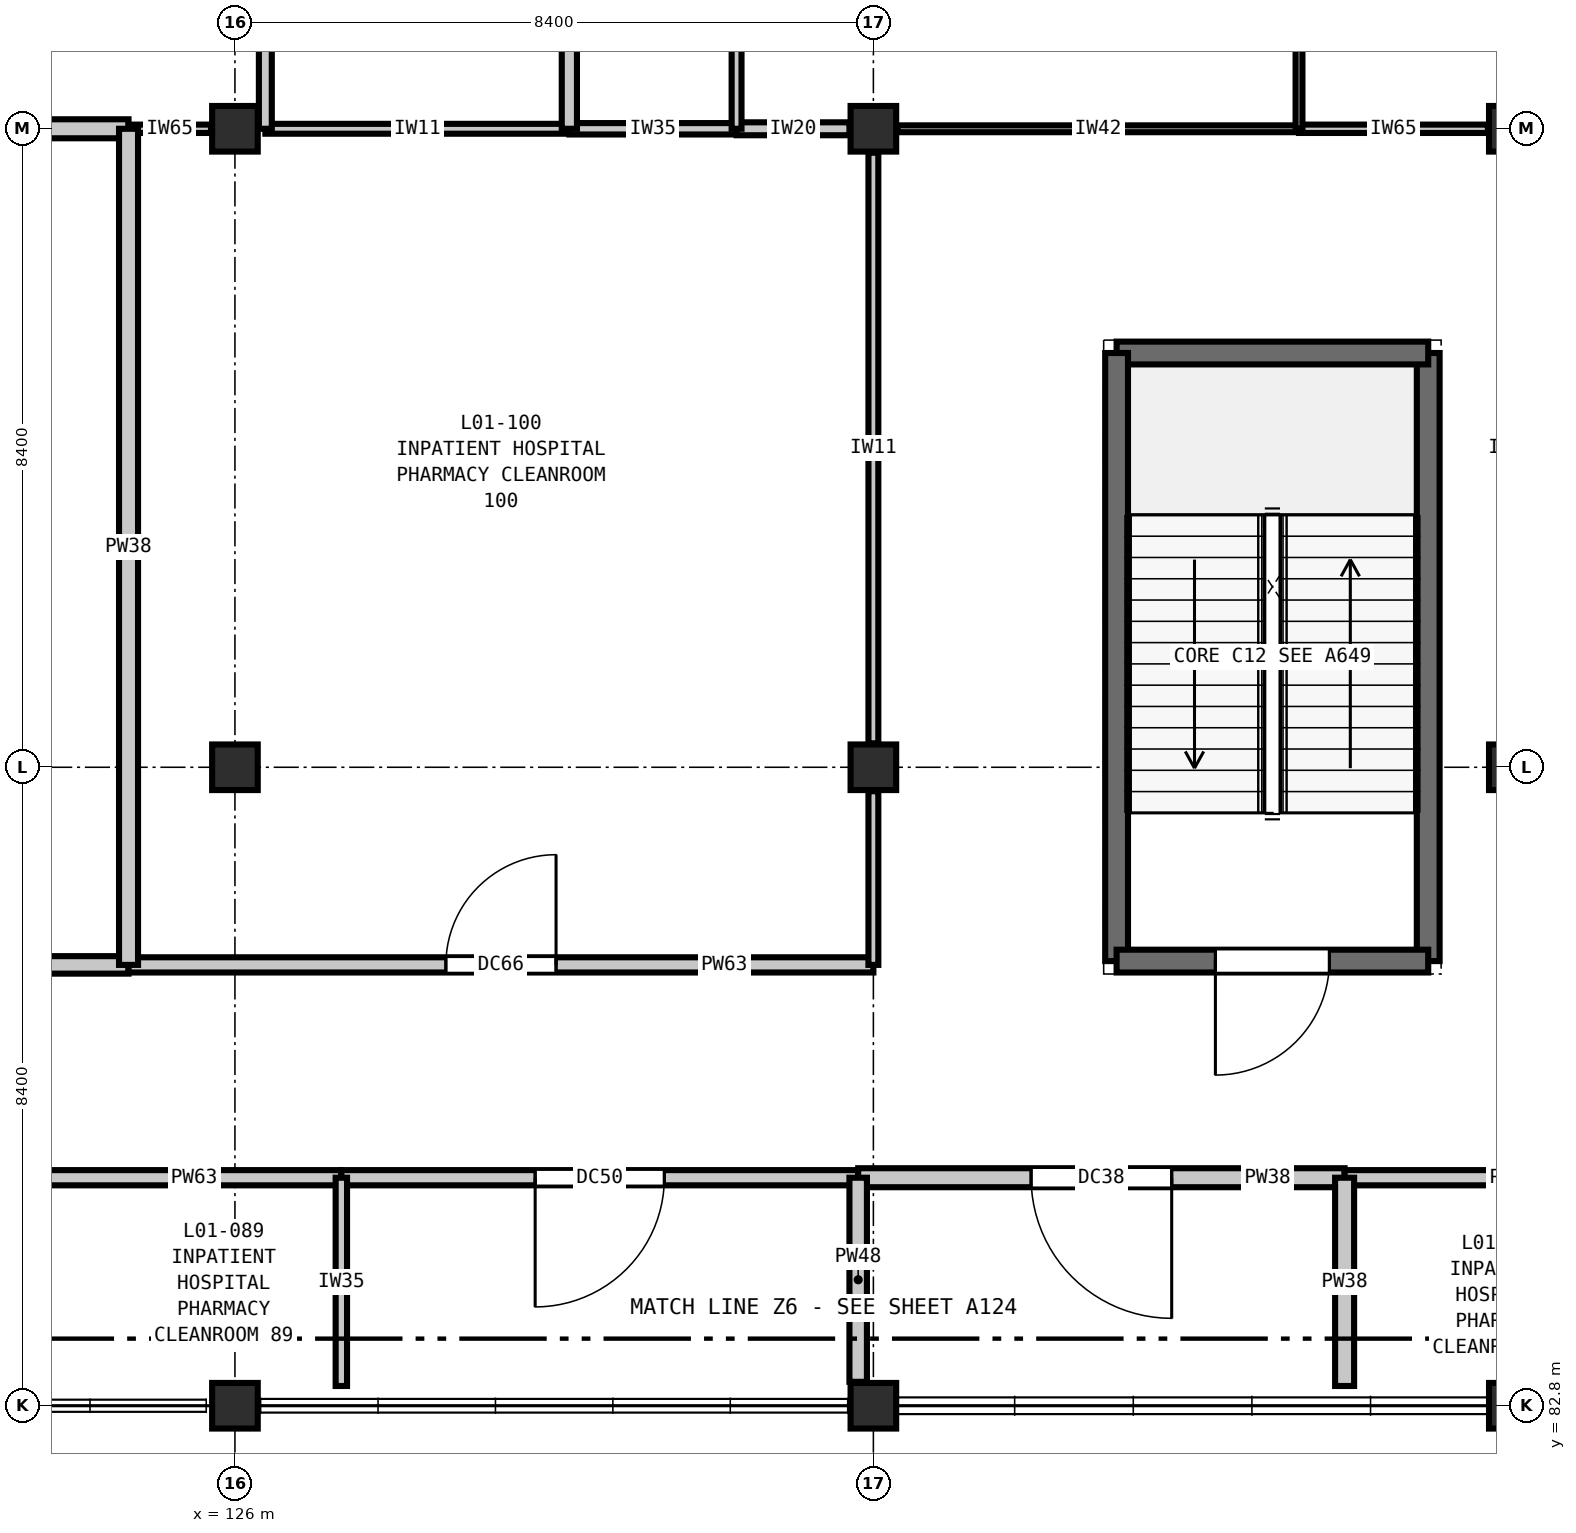
"""IFC4 building model, lengths in metres.
Left out: names, types, materials, properties, quantities, classifications, styles, units other than length and angle.
Written with IfcOpenShell. Run it as: python <this file> out.ifc"""

import sys

from ifc_helpers import new_model, si_unit, direction, frame, frame_2d, origin, origin_2d, place, context, subcontext, project, spatial, rectangle, extrude, element, fill, save


model = new_model("IFC4")
c1 = context("Model", 3, precision=1e-05, world=origin(), true_north=direction((0.0, 1.0)))
c2 = subcontext(c1, "Body", "Model", "MODEL_VIEW")
j1 = project(units=[si_unit("LENGTHUNIT", "METRE"), si_unit("PLANEANGLEUNIT", "RADIAN")], contexts=[c1])
p1 = place(None, origin())
s1 = spatial("IfcSite", under=j1, at=p1, CompositionType="ELEMENT")
p2 = place(p1, origin())
s2 = spatial("IfcBuilding", under=s1, at=p2, CompositionType="ELEMENT")
p3 = place(p2, frame((0.0, 0.0, 5.4)))
s3 = spatial("IfcBuildingStorey", under=s2, at=p3, CompositionType="ELEMENT", Elevation=5.4)
for number, where, z_axis, x_axis in (
    (1, (126.0, 82.8, 0.0), (0.0, 0.0, 1.0), (1.0, 0.0, 0.0)),
    (2, (126.0, 91.2, 0.0), (0.0, 0.0, 1.0), (1.0, 0.0, 0.0)),
    (3, (126.0, 99.6, 0.0), (0.0, 0.0, 1.0), (1.0, 0.0, 0.0)),
    (4, (134.4, 82.8, 0.0), (0.0, 0.0, 1.0), (1.0, 0.0, 0.0)),
    (5, (134.4, 91.2, 0.0), (0.0, 0.0, 1.0), (1.0, 0.0, 0.0)),
    (6, (134.4, 99.6, 0.0), (0.0, 0.0, 1.0), (1.0, 0.0, 0.0)),
    (7, (142.8, 82.8, 0.0), (0.0, 0.0, 1.0), (1.0, 0.0, 0.0)),
    (8, (142.8, 91.2, 0.0), (0.0, 0.0, 1.0), (1.0, 0.0, 0.0)),
    (9, (142.8, 99.6, 0.0), (0.0, 0.0, 1.0), (1.0, 0.0, 0.0)),
):
    element("IfcColumn", number, at=place(p3, frame(where, z_axis=z_axis, x_axis=x_axis)), inside=s3, PredefinedType="COLUMN", context=c2, shape_type="SweptSolid", body=[
        extrude(rectangle(XDim=0.6, YDim=0.6, at=origin_2d()), origin(), (0.0, 0.0, 1.0), 5.4),
    ])
p4 = place(p3, frame((141.7, 88.65, 0.0), z_axis=(0.0, 0.0, 1.0), x_axis=(0.0, 1.0, 0.0)))
e10 = element("IfcWall", 10, at=p4, inside=s3, PredefinedType="SHEAR", context=c2, shape_type="SweptSolid", body=[
    extrude(rectangle(XDim=8.0, YDim=0.3, at=frame_2d((4.0, 0.0))), origin(), (0.0, 0.0, 1.0), 5.4),
])
p5 = place(p3, frame((141.7, 96.65, 0.0), z_axis=(0.0, 0.0, 1.0), x_axis=(-1.0, 0.0, 0.0)))
e11 = element("IfcWall", 11, at=p5, inside=s3, PredefinedType="SHEAR", context=c2, shape_type="SweptSolid", body=[
    extrude(rectangle(XDim=4.1, YDim=0.3, at=frame_2d((2.05, 0.0))), origin(), (0.0, 0.0, 1.0), 5.4),
])
p6 = place(p3, frame((137.6, 96.65, 0.0), z_axis=(0.0, 0.0, 1.0), x_axis=(0.0, -1.0, 0.0)))
e12 = element("IfcWall", 12, at=p6, inside=s3, PredefinedType="SHEAR", context=c2, shape_type="SweptSolid", body=[
    extrude(rectangle(XDim=8.0, YDim=0.3, at=frame_2d((4.0, 0.0))), origin(), (0.0, 0.0, 1.0), 5.4),
])
p7 = place(p3, frame((137.6, 88.65, 0.0), z_axis=(0.0, 0.0, 1.0), x_axis=(1.0, 0.0, 0.0)))
e13 = element("IfcWall", 13, at=p7, inside=s3, PredefinedType="SHEAR", context=c2, shape_type="SweptSolid", body=[
    extrude(rectangle(XDim=4.1, YDim=0.3, at=frame_2d((2.05, 0.0))), origin(), (0.0, 0.0, 1.0), 5.4),
])
p8 = place(p7, frame((1.3, 0.0, 0.0)))
e14 = element("IfcOpeningElement", 14, at=p8, cuts=e13, PredefinedType="OPENING", context=c2, shape_type="SweptSolid", body=[
    extrude(rectangle(XDim=1.5, YDim=2.2, at=frame_2d((0.75, 1.1))), frame((0.0, 0.16, 0.0), z_axis=(0.0, -1.0, 0.0), x_axis=(1.0, 0.0, 0.0)), (0.0, 0.0, 1.0), 0.32),
])
p9 = place(p3, frame((117.6, 85.8, 0.0), z_axis=(0.0, 0.0, 1.0), x_axis=(1.0, 0.0, 0.0)))
e15 = element("IfcWall", 15, at=p9, inside=s3, PredefinedType="PARTITIONING", context=c2, shape_type="SweptSolid", body=[
    extrude(rectangle(XDim=9.8, YDim=0.2, at=frame_2d((4.9, 0.0))), origin(), (0.0, 0.0, 1.0), 5.05),
])
p10 = place(p9, frame((4.125, 0.0, 0.0)))
e16 = element("IfcOpeningElement", 16, at=p10, cuts=e15, PredefinedType="OPENING", context=c2, shape_type="SweptSolid", body=[
    extrude(rectangle(XDim=1.55, YDim=2.25, at=frame_2d((0.775, 1.125))), frame((0.0, 0.11, 0.0), z_axis=(0.0, -1.0, 0.0), x_axis=(1.0, 0.0, 0.0)), (0.0, 0.0, 1.0), 0.22),
])
p11 = place(p3, frame((127.4, 85.8, 0.0), z_axis=(0.0, 0.0, 1.0), x_axis=(1.0, 0.0, 0.0)))
e17 = element("IfcWall", 17, at=p11, inside=s3, PredefinedType="PARTITIONING", context=c2, shape_type="SweptSolid", body=[
    extrude(rectangle(XDim=6.8, YDim=0.2, at=frame_2d((3.4, 0.0))), origin(), (0.0, 0.0, 1.0), 5.05),
])
p12 = place(p11, frame((2.55, 0.0, 0.0)))
e18 = element("IfcOpeningElement", 18, at=p12, cuts=e17, PredefinedType="OPENING", context=c2, shape_type="SweptSolid", body=[
    extrude(rectangle(XDim=1.7, YDim=2.3, at=frame_2d((0.85, 1.15))), frame((0.0, 0.11, 0.0), z_axis=(0.0, -1.0, 0.0), x_axis=(1.0, 0.0, 0.0)), (0.0, 0.0, 1.0), 0.22),
])
p13 = place(p3, frame((134.2, 85.8, 0.0), z_axis=(0.0, 0.0, 1.0), x_axis=(1.0, 0.0, 0.0)))
e19 = element("IfcWall", 19, at=p13, inside=s3, PredefinedType="PARTITIONING", context=c2, shape_type="SweptSolid", body=[
    extrude(rectangle(XDim=6.4, YDim=0.25, at=frame_2d((3.2, 0.0))), origin(), (0.0, 0.0, 1.0), 5.05),
])
p14 = place(p13, frame((2.275, 0.0, 0.0)))
e20 = element("IfcOpeningElement", 20, at=p14, cuts=e19, PredefinedType="OPENING", context=c2, shape_type="SweptSolid", body=[
    extrude(rectangle(XDim=1.85, YDim=2.3, at=frame_2d((0.925, 1.15))), frame((0.0, 0.135, 0.0), z_axis=(0.0, -1.0, 0.0), x_axis=(1.0, 0.0, 0.0)), (0.0, 0.0, 1.0), 0.27),
])
p15 = place(p3, frame((140.6, 85.8, 0.0), z_axis=(0.0, 0.0, 1.0), x_axis=(1.0, 0.0, 0.0)))
e21 = element("IfcWall", 21, at=p15, inside=s3, PredefinedType="PARTITIONING", context=c2, shape_type="SweptSolid", body=[
    extrude(rectangle(XDim=10.6, YDim=0.2, at=frame_2d((5.3, 0.0))), origin(), (0.0, 0.0, 1.0), 5.05),
])
p16 = place(p15, frame((4.675, 0.0, 0.0)))
e22 = element("IfcOpeningElement", 22, at=p16, cuts=e21, PredefinedType="OPENING", context=c2, shape_type="SweptSolid", body=[
    extrude(rectangle(XDim=1.25, YDim=2.15, at=frame_2d((0.625, 1.075))), frame((0.0, 0.11, 0.0), z_axis=(0.0, -1.0, 0.0), x_axis=(1.0, 0.0, 0.0)), (0.0, 0.0, 1.0), 0.22),
])
p17 = place(p3, frame((118.2, 88.6, 0.0), z_axis=(0.0, 0.0, 1.0), x_axis=(1.0, 0.0, 0.0)))
e23 = element("IfcWall", 23, at=p17, inside=s3, PredefinedType="PARTITIONING", context=c2, shape_type="SweptSolid", body=[
    extrude(rectangle(XDim=6.4, YDim=0.23, at=frame_2d((3.2, 0.0))), origin(), (0.0, 0.0, 1.0), 5.05),
])
p18 = place(p17, frame((2.525, 0.0, 0.0)))
e24 = element("IfcOpeningElement", 24, at=p18, cuts=e23, PredefinedType="OPENING", context=c2, shape_type="SweptSolid", body=[
    extrude(rectangle(XDim=1.35, YDim=2.2, at=frame_2d((0.675, 1.1))), frame((0.0, 0.125, 0.0), z_axis=(0.0, -1.0, 0.0), x_axis=(1.0, 0.0, 0.0)), (0.0, 0.0, 1.0), 0.25),
])
p19 = place(p3, frame((124.6, 88.6, 0.0), z_axis=(0.0, 0.0, 1.0), x_axis=(1.0, 0.0, 0.0)))
e25 = element("IfcWall", 25, at=p19, inside=s3, PredefinedType="PARTITIONING", context=c2, shape_type="SweptSolid", body=[
    extrude(rectangle(XDim=9.8, YDim=0.2, at=frame_2d((4.9, 0.0))), origin(), (0.0, 0.0, 1.0), 5.05),
])
p20 = place(p19, frame((4.175, 0.0, 0.0)))
e26 = element("IfcOpeningElement", 26, at=p20, cuts=e25, PredefinedType="OPENING", context=c2, shape_type="SweptSolid", body=[
    extrude(rectangle(XDim=1.45, YDim=2.25, at=frame_2d((0.725, 1.125))), frame((0.0, 0.11, 0.0), z_axis=(0.0, -1.0, 0.0), x_axis=(1.0, 0.0, 0.0)), (0.0, 0.0, 1.0), 0.22),
])
p21 = place(p3, frame((119.0, 99.6, 0.0), z_axis=(0.0, 0.0, 1.0), x_axis=(1.0, 0.0, 0.0)))
e27 = element("IfcWall", 27, at=p21, inside=s3, PredefinedType="PARTITIONING", context=c2, shape_type="SweptSolid", body=[
    extrude(rectangle(XDim=5.6, YDim=0.25, at=frame_2d((2.8, 0.0))), origin(), (0.0, 0.0, 1.0), 4.685),
])
p22 = place(p3, frame((124.6, 99.6, 0.0), z_axis=(0.0, 0.0, 1.0), x_axis=(1.0, 0.0, 0.0)))
e28 = element("IfcWall", 28, at=p22, inside=s3, PredefinedType="PARTITIONING", context=c2, shape_type="SweptSolid", body=[
    extrude(rectangle(XDim=1.085, YDim=0.11, at=frame_2d((0.542, 0.0))), origin(), (0.0, 0.0, 1.0), 4.685),
])
p23 = place(p3, frame((126.4, 99.6, 0.0), z_axis=(0.0, 0.0, 1.0), x_axis=(1.0, 0.0, 0.0)))
e29 = element("IfcWall", 29, at=p23, inside=s3, PredefinedType="PARTITIONING", context=c2, shape_type="SweptSolid", body=[
    extrude(rectangle(XDim=4.0, YDim=0.13, at=frame_2d((2.0, 0.0))), origin(), (0.0, 0.0, 1.0), 4.685),
])
p24 = place(p3, frame((130.4, 99.6, 0.0), z_axis=(0.0, 0.0, 1.0), x_axis=(1.0, 0.0, 0.0)))
e30 = element("IfcWall", 30, at=p24, inside=s3, PredefinedType="PARTITIONING", context=c2, shape_type="SweptSolid", body=[
    extrude(rectangle(XDim=2.2, YDim=0.15, at=frame_2d((1.1, 0.0))), origin(), (0.0, 0.0, 1.0), 4.685),
])
p25 = place(p3, frame((132.6, 99.6, 0.0), z_axis=(0.0, 0.0, 1.0), x_axis=(1.0, 0.0, 0.0)))
e31 = element("IfcWall", 31, at=p25, inside=s3, PredefinedType="PARTITIONING", context=c2, shape_type="SweptSolid", body=[
    extrude(rectangle(XDim=1.485, YDim=0.17, at=frame_2d((0.742, 0.0))), origin(), (0.0, 0.0, 1.0), 4.685),
])
p26 = place(p3, frame((134.715, 99.6, 0.0), z_axis=(0.0, 0.0, 1.0), x_axis=(1.0, 0.0, 0.0)))
e32 = element("IfcWall", 32, at=p26, inside=s3, PredefinedType="PARTITIONING", context=c2, shape_type="SweptSolid", body=[
    extrude(rectangle(XDim=5.285, YDim=0.09, at=frame_2d((2.643, 0.0))), origin(), (0.0, 0.0, 1.0), 4.685),
])
p27 = place(p3, frame((140.0, 99.6, 0.0), z_axis=(0.0, 0.0, 1.0), x_axis=(1.0, 0.0, 0.0)))
e33 = element("IfcWall", 33, at=p27, inside=s3, PredefinedType="PARTITIONING", context=c2, shape_type="SweptSolid", body=[
    extrude(rectangle(XDim=2.485, YDim=0.11, at=frame_2d((1.243, 0.0))), origin(), (0.0, 0.0, 1.0), 4.685),
])
p28 = place(p3, frame((124.6, 88.6, 0.0), z_axis=(0.0, 0.0, 1.0), x_axis=(0.0, 1.0, 0.0)))
e34 = element("IfcWall", 34, at=p28, inside=s3, PredefinedType="PARTITIONING", context=c2, shape_type="SweptSolid", body=[
    extrude(rectangle(XDim=11.0, YDim=0.25, at=frame_2d((5.5, 0.0))), origin(), (0.0, 0.0, 1.0), 5.05),
])
p29 = place(p3, frame((126.4, 99.6, 0.0), z_axis=(0.0, 0.0, 1.0), x_axis=(0.0, 1.0, 0.0)))
e35 = element("IfcWall", 35, at=p29, inside=s3, PredefinedType="PARTITIONING", context=c2, shape_type="SweptSolid", body=[
    extrude(rectangle(XDim=13.6, YDim=0.17, at=frame_2d((6.8, 0.0))), origin(), (0.0, 0.0, 1.0), 5.05),
])
p30 = place(p3, frame((127.4, 83.06, 0.0), z_axis=(0.0, 0.0, 1.0), x_axis=(0.0, 1.0, 0.0)))
e36 = element("IfcWall", 36, at=p30, inside=s3, PredefinedType="PARTITIONING", context=c2, shape_type="SweptSolid", body=[
    extrude(rectangle(XDim=2.74, YDim=0.15, at=frame_2d((1.37, 0.0))), origin(), (0.0, 0.0, 1.0), 5.05),
])
p31 = place(p3, frame((130.4, 99.6, 0.0), z_axis=(0.0, 0.0, 1.0), x_axis=(0.0, 1.0, 0.0)))
e37 = element("IfcWall", 37, at=p31, inside=s3, PredefinedType="PARTITIONING", context=c2, shape_type="SweptSolid", body=[
    extrude(rectangle(XDim=6.8, YDim=0.2, at=frame_2d((3.4, 0.0))), origin(), (0.0, 0.0, 1.0), 5.05),
])
p32 = place(p31, frame((2.75, 0.0, 0.0)))
e38 = element("IfcOpeningElement", 38, at=p32, cuts=e37, PredefinedType="OPENING", context=c2, shape_type="SweptSolid", body=[
    extrude(rectangle(XDim=1.3, YDim=2.2, at=frame_2d((0.65, 1.1))), frame((0.0, 0.11, 0.0), z_axis=(0.0, -1.0, 0.0), x_axis=(1.0, 0.0, 0.0)), (0.0, 0.0, 1.0), 0.22),
])
p33 = place(p3, frame((132.6, 99.6, 0.0), z_axis=(0.0, 0.0, 1.0), x_axis=(0.0, 1.0, 0.0)))
e39 = element("IfcWall", 39, at=p33, inside=s3, PredefinedType="PARTITIONING", context=c2, shape_type="SweptSolid", body=[
    extrude(rectangle(XDim=6.8, YDim=0.13, at=frame_2d((3.4, 0.0))), origin(), (0.0, 0.0, 1.0), 5.05),
])
p34 = place(p3, frame((134.2, 83.115, 0.0), z_axis=(0.0, 0.0, 1.0), x_axis=(0.0, 1.0, 0.0)))
e40 = element("IfcWall", 40, at=p34, inside=s3, PredefinedType="PARTITIONING", context=c2, shape_type="SweptSolid", body=[
    extrude(rectangle(XDim=2.685, YDim=0.23, at=frame_2d((1.343, 0.0))), origin(), (0.0, 0.0, 1.0), 4.735),
])
p35 = place(p3, frame((134.4, 91.515, 0.0), z_axis=(0.0, 0.0, 1.0), x_axis=(0.0, 1.0, 0.0)))
e41 = element("IfcWall", 41, at=p35, inside=s3, PredefinedType="PARTITIONING", context=c2, shape_type="SweptSolid", body=[
    extrude(rectangle(XDim=7.77, YDim=0.13, at=frame_2d((3.885, 0.0))), origin(), (0.0, 0.0, 1.0), 4.735),
])
p36 = place(p3, frame((134.4, 88.6, 0.0), z_axis=(0.0, 0.0, 1.0), x_axis=(0.0, 1.0, 0.0)))
e42 = element("IfcWall", 42, at=p36, inside=s3, PredefinedType="PARTITIONING", context=c2, shape_type="SweptSolid", body=[
    extrude(rectangle(XDim=2.285, YDim=0.13, at=frame_2d((1.143, 0.0))), origin(), (0.0, 0.0, 1.0), 4.735),
])
p37 = place(p3, frame((140.0, 99.6, 0.0), z_axis=(0.0, 0.0, 1.0), x_axis=(0.0, 1.0, 0.0)))
e43 = element("IfcWall", 43, at=p37, inside=s3, PredefinedType="PARTITIONING", context=c2, shape_type="SweptSolid", body=[
    extrude(rectangle(XDim=13.6, YDim=0.09, at=frame_2d((6.8, 0.0))), origin(), (0.0, 0.0, 1.0), 5.05),
])
p38 = place(p3, frame((140.6, 83.06, 0.0), z_axis=(0.0, 0.0, 1.0), x_axis=(0.0, 1.0, 0.0)))
e44 = element("IfcWall", 44, at=p38, inside=s3, PredefinedType="PARTITIONING", context=c2, shape_type="SweptSolid", body=[
    extrude(rectangle(XDim=2.74, YDim=0.25, at=frame_2d((1.37, 0.0))), origin(), (0.0, 0.0, 1.0), 5.05),
])
p39 = place(p8, frame((1.5, 0.0, 0.0), z_axis=(0.0, 0.0, 1.0), x_axis=(-1.0, 0.0, 0.0)))
e45 = element("IfcDoor", 45, at=p39, inside=s3, OperationType="SINGLE_SWING_RIGHT", PredefinedType="DOOR", context=c2, shape_type="SweptSolid", body=[
    extrude(rectangle(XDim=1.5, YDim=2.2, at=frame_2d((0.75, 1.1))), frame((0.0, 0.025, 0.0), z_axis=(0.0, -1.0, 0.0), x_axis=(1.0, 0.0, 0.0)), (0.0, 0.0, 1.0), 0.05),
])
fill(e14, e45)
p40 = place(p12, frame((1.7, 0.0, 0.0), z_axis=(0.0, 0.0, 1.0), x_axis=(-1.0, 0.0, 0.0)))
e46 = element("IfcDoor", 46, at=p40, inside=s3, OperationType="SINGLE_SWING_RIGHT", PredefinedType="DOOR", context=c2, shape_type="SweptSolid", body=[
    extrude(rectangle(XDim=1.7, YDim=2.3, at=frame_2d((0.85, 1.15))), frame((0.0, 0.025, 0.0), z_axis=(0.0, -1.0, 0.0), x_axis=(1.0, 0.0, 0.0)), (0.0, 0.0, 1.0), 0.05),
])
fill(e18, e46)
p41 = place(p14, frame((1.85, 0.0, 0.0), z_axis=(0.0, 0.0, 1.0), x_axis=(-1.0, 0.0, 0.0)))
e47 = element("IfcDoor", 47, at=p41, inside=s3, OperationType="SINGLE_SWING_LEFT", PredefinedType="DOOR", context=c2, shape_type="SweptSolid", body=[
    extrude(rectangle(XDim=1.85, YDim=2.3, at=frame_2d((0.925, 1.15))), frame((0.0, 0.025, 0.0), z_axis=(0.0, -1.0, 0.0), x_axis=(1.0, 0.0, 0.0)), (0.0, 0.0, 1.0), 0.05),
])
fill(e20, e47)
p42 = place(p20, origin())
e48 = element("IfcDoor", 48, at=p42, inside=s3, OperationType="SINGLE_SWING_RIGHT", PredefinedType="DOOR", context=c2, shape_type="SweptSolid", body=[
    extrude(rectangle(XDim=1.45, YDim=2.25, at=frame_2d((0.725, 1.125))), frame((0.0, 0.025, 0.0), z_axis=(0.0, -1.0, 0.0), x_axis=(1.0, 0.0, 0.0)), (0.0, 0.0, 1.0), 0.05),
])
fill(e26, e48)
save(model, sys.argv[1])
